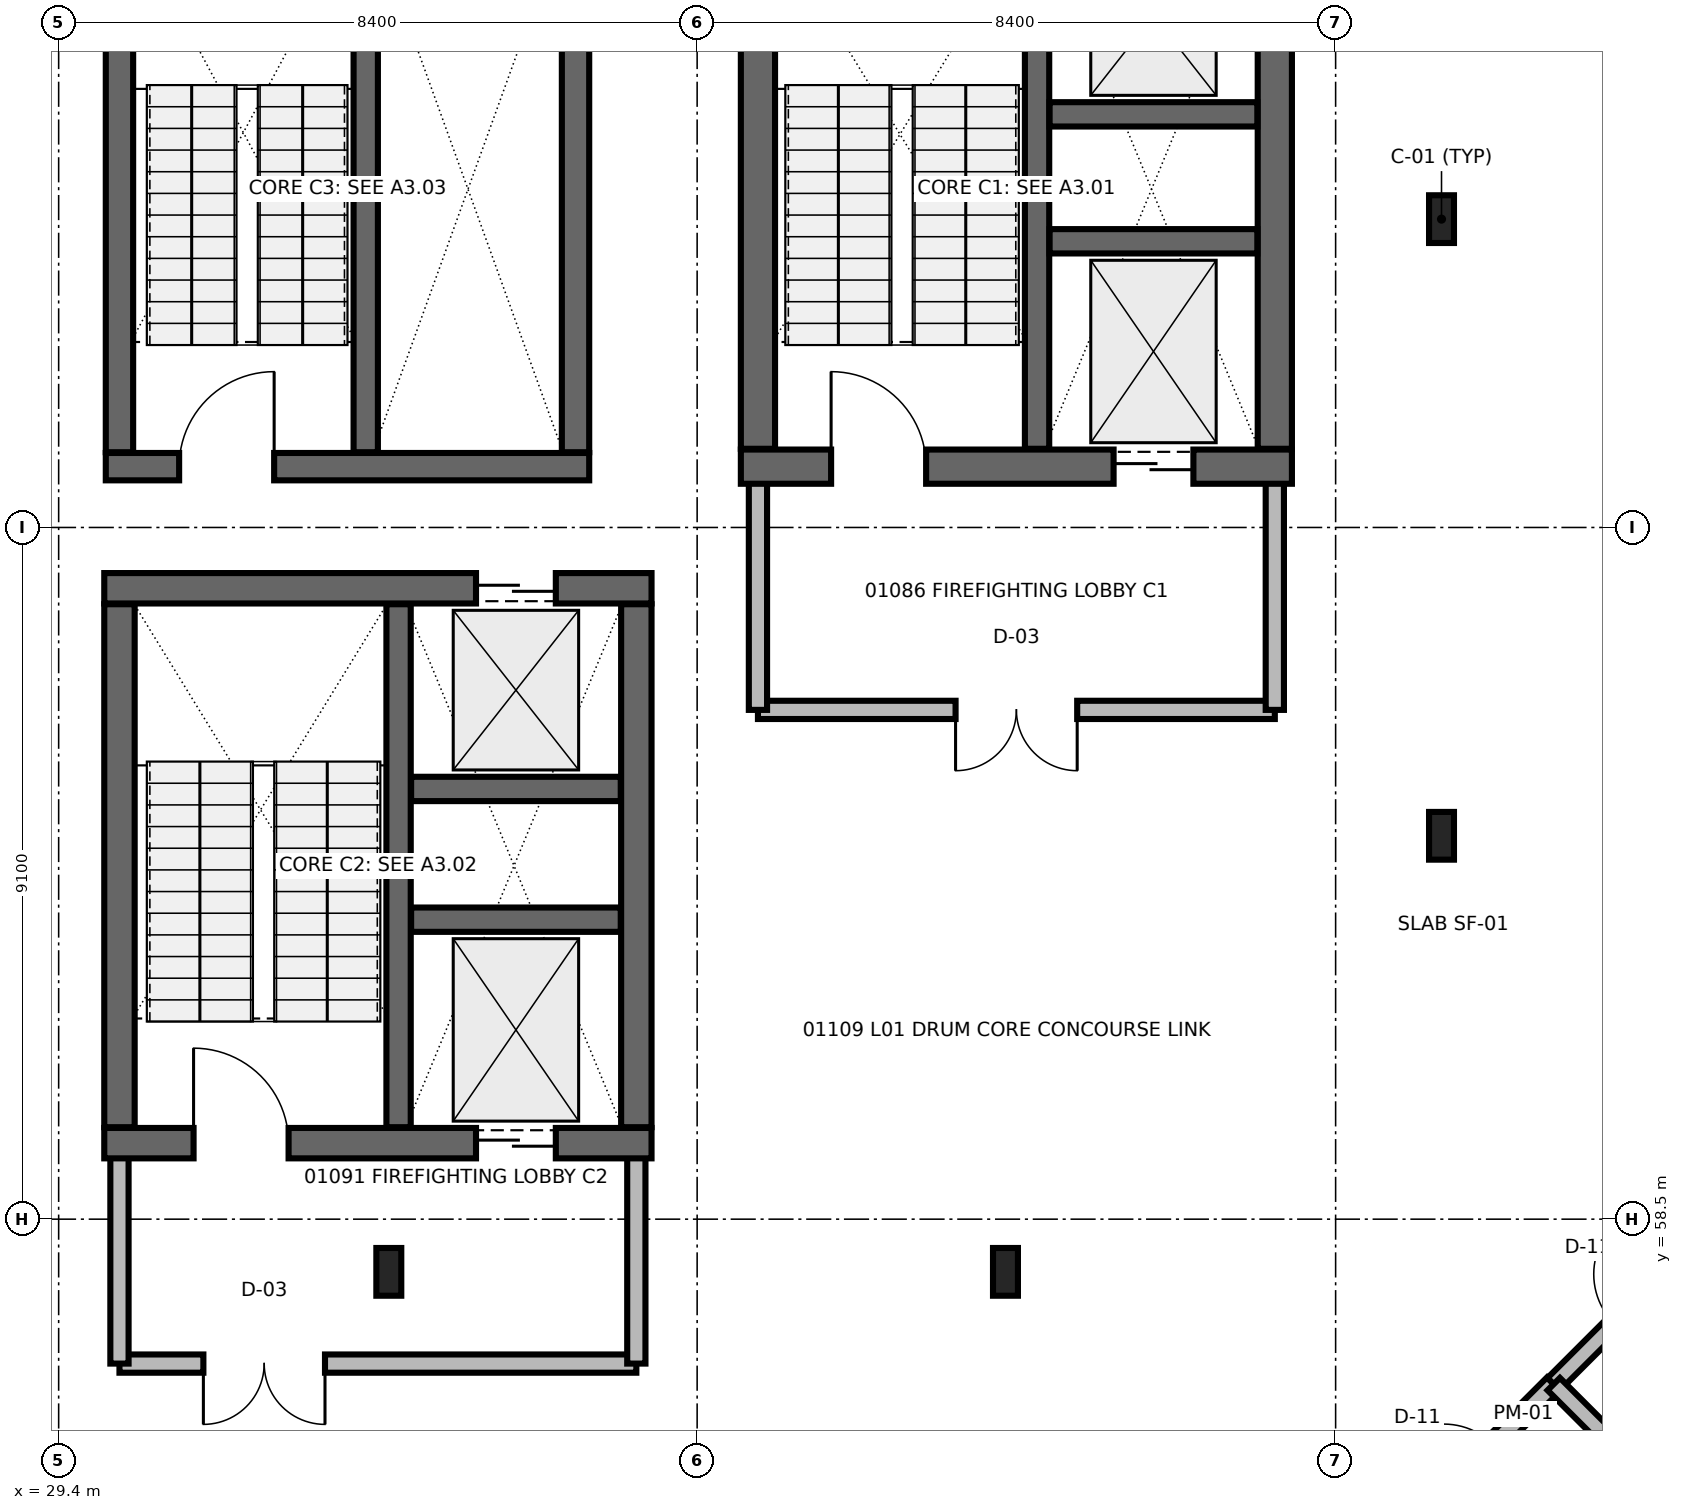
"""IFC4 building model, lengths in metres.
Left out: names, types, materials, properties, quantities, classifications, styles, units other than length and angle.
Written with IfcOpenShell. Run it as: python <this file> out.ifc"""

import sys

from ifc_helpers import new_model, si_unit, direction, frame, frame_2d, origin, origin_2d, place, context, subcontext, project, spatial, rectangle, i_section, extrude, element, fill, save


model = new_model("IFC4")
c1 = context("Model", 3, precision=1e-05, world=origin(), true_north=direction((0.0, 1.0)))
c2 = subcontext(c1, "Body", "Model", "MODEL_VIEW")
j1 = project(units=[si_unit("LENGTHUNIT", "METRE"), si_unit("PLANEANGLEUNIT", "RADIAN")], contexts=[c1])
p1 = place(None, origin())
s1 = spatial("IfcSite", under=j1, at=p1, CompositionType="ELEMENT")
p2 = place(p1, origin())
s2 = spatial("IfcBuilding", under=s1, at=p2, CompositionType="ELEMENT")
p3 = place(p2, frame((0.0, 0.0, 5.1)))
s3 = spatial("IfcBuildingStorey", under=s2, at=p3, CompositionType="ELEMENT", Elevation=5.1)
for number, where, z_axis, x_axis in (
    (1, (47.593, 71.656, 0.0), (0.0, 0.0, 1.0), (1.0, 0.0, 0.0)),
    (2, (33.744, 57.807, 0.0), (0.0, 0.0, 1.0), (1.0, 0.0, 0.0)),
    (3, (41.856, 57.807, 0.0), (0.0, 0.0, 1.0), (1.0, 0.0, 0.0)),
    (4, (47.593, 63.544, 0.0), (0.0, 0.0, 1.0), (1.0, 0.0, 0.0)),
):
    element("IfcColumn", number, at=place(p3, frame(where, z_axis=z_axis, x_axis=x_axis)), inside=s3, PredefinedType="COLUMN", context=c2, shape_type="SweptSolid", body=[
        extrude(i_section(OverallWidth=0.328, OverallDepth=0.628, WebThickness=0.017, FlangeThickness=0.028, at=origin_2d()), origin(), (0.0, 0.0, 1.0), 4.5),
    ])
p4 = place(p3, frame((49.572, 49.842, 0.0), z_axis=(0.0, 0.0, 1.0), x_axis=(0.707106781187, 0.707106781187, 0.0)))
e5 = element("IfcWall", 5, at=p4, inside=s3, PredefinedType="SOLIDWALL", context=c2, shape_type="SweptSolid", body=[
    extrude(rectangle(XDim=8.368, YDim=0.26, at=frame_2d((4.184, 0.0))), origin(), (0.0, 0.0, 1.0), 1.48),
])
p5 = place(p3, frame((38.6, 65.2, 0.0), z_axis=(0.0, 0.0, 1.0), x_axis=(1.0, 0.0, 0.0)))
e6 = element("IfcWall", 6, at=p5, inside=s3, PredefinedType="SOLIDWALL", context=c2, shape_type="SweptSolid", body=[
    extrude(rectangle(XDim=6.8, YDim=0.24, at=frame_2d((3.4, 0.0))), origin(), (0.0, 0.0, 1.0), 4.2),
])
p6 = place(p5, frame((2.6, 0.0, 0.0)))
e7 = element("IfcOpeningElement", 7, at=p6, cuts=e6, PredefinedType="OPENING", context=c2, shape_type="SweptSolid", body=[
    extrude(rectangle(XDim=1.6, YDim=2.2, at=frame_2d((0.8, 1.1))), frame((0.0, 0.13, 0.0), z_axis=(0.0, -1.0, 0.0), x_axis=(1.0, 0.0, 0.0)), (0.0, 0.0, 1.0), 0.26),
])
for number, where, z_axis, x_axis in (
    (8, (38.6, 68.4, 0.0), (0.0, 0.0, 1.0), (0.0, -1.0, 0.0)),
    (9, (45.4, 65.2, 0.0), (0.0, 0.0, 1.0), (0.0, 1.0, 0.0)),
):
    element("IfcWall", number, at=place(p3, frame(where, z_axis=z_axis, x_axis=x_axis)), inside=s3, PredefinedType="SOLIDWALL", context=c2, shape_type="SweptSolid", body=[
        extrude(rectangle(XDim=3.2, YDim=0.24, at=frame_2d((1.6, 0.0))), origin(), (0.0, 0.0, 1.0), 4.2),
    ])
p7 = place(p3, frame((38.375, 68.4, 0.0), z_axis=(0.0, 0.0, 1.0), x_axis=(1.0, 0.0, 0.0)))
e10 = element("IfcWall", 10, at=p7, inside=s3, PredefinedType="SHEAR", context=c2, shape_type="SweptSolid", body=[
    extrude(rectangle(XDim=7.25, YDim=0.45, at=frame_2d((3.625, 0.0))), origin(), (0.0, 0.0, 1.0), 4.22),
])
p8 = place(p7, frame((1.188, 0.0, 0.0)))
e11 = element("IfcOpeningElement", 11, at=p8, cuts=e10, PredefinedType="OPENING", context=c2, shape_type="SweptSolid", body=[
    extrude(rectangle(XDim=1.25, YDim=2.2, at=frame_2d((0.625, 1.1))), frame((0.0, 0.235, 0.0), z_axis=(0.0, -1.0, 0.0), x_axis=(1.0, 0.0, 0.0)), (0.0, 0.0, 1.0), 0.47),
])
p9 = place(p7, frame((4.904, 0.0, 0.0)))
e12 = element("IfcOpeningElement", 12, at=p9, cuts=e10, PredefinedType="OPENING", context=c2, shape_type="SweptSolid", body=[
    extrude(rectangle(XDim=1.05, YDim=2.15, at=frame_2d((0.525, 1.075))), frame((0.0, 0.235, 0.0), z_axis=(0.0, -1.0, 0.0), x_axis=(1.0, 0.0, 0.0)), (0.0, 0.0, 1.0), 0.47),
])
for number, where, z_axis, x_axis in (
    (13, (38.6, 68.635, 0.0), (0.0, 0.0, 1.0), (0.0, 1.0, 0.0)),
    (14, (45.4, 68.635, 0.0), (0.0, 0.0, 1.0), (0.0, 1.0, 0.0)),
):
    element("IfcWall", number, at=place(p3, frame(where, z_axis=z_axis, x_axis=x_axis)), inside=s3, PredefinedType="SHEAR", context=c2, shape_type="SweptSolid", body=[
        extrude(rectangle(XDim=6.83, YDim=0.45, at=frame_2d((3.415, 0.0))), origin(), (0.0, 0.0, 1.0), 4.22),
    ])
p10 = place(p3, frame((42.272, 68.635, 0.0), z_axis=(0.0, 0.0, 1.0), x_axis=(0.0, 1.0, 0.0)))
e15 = element("IfcWall", 15, at=p10, inside=s3, PredefinedType="SHEAR", context=c2, shape_type="SweptSolid", body=[
    extrude(rectangle(XDim=6.83, YDim=0.32, at=frame_2d((3.415, 0.0))), origin(), (0.0, 0.0, 1.0), 4.22),
])
for number, where, z_axis, x_axis in (
    (16, (42.437, 71.365, 0.0), (0.0, 0.0, 1.0), (1.0, 0.0, 0.0)),
    (17, (42.437, 73.035, 0.0), (0.0, 0.0, 1.0), (1.0, 0.0, 0.0)),
):
    element("IfcWall", number, at=place(p3, frame(where, z_axis=z_axis, x_axis=x_axis)), inside=s3, PredefinedType="SHEAR", context=c2, shape_type="SweptSolid", body=[
        extrude(rectangle(XDim=2.733, YDim=0.32, at=frame_2d((1.366, 0.0))), origin(), (0.0, 0.0, 1.0), 4.22),
    ])
p11 = place(p3, frame((30.2, 56.6, 0.0), z_axis=(0.0, 0.0, 1.0), x_axis=(1.0, 0.0, 0.0)))
e18 = element("IfcWall", 18, at=p11, inside=s3, PredefinedType="SOLIDWALL", context=c2, shape_type="SweptSolid", body=[
    extrude(rectangle(XDim=6.8, YDim=0.24, at=frame_2d((3.4, 0.0))), origin(), (0.0, 0.0, 1.0), 3.599),
])
p12 = place(p11, frame((1.104, 0.0, 0.0)))
e19 = element("IfcOpeningElement", 19, at=p12, cuts=e18, PredefinedType="OPENING", context=c2, shape_type="SweptSolid", body=[
    extrude(rectangle(XDim=1.6, YDim=2.2, at=frame_2d((0.8, 1.1))), frame((0.0, 0.13, 0.0), z_axis=(0.0, -1.0, 0.0), x_axis=(1.0, 0.0, 0.0)), (0.0, 0.0, 1.0), 0.26),
])
p13 = place(p3, frame((30.2, 59.5, 0.0), z_axis=(0.0, 0.0, 1.0), x_axis=(0.0, -1.0, 0.0)))
e20 = element("IfcWall", 20, at=p13, inside=s3, PredefinedType="SOLIDWALL", context=c2, shape_type="SweptSolid", body=[
    extrude(rectangle(XDim=2.9, YDim=0.24, at=frame_2d((1.45, 0.0))), origin(), (0.0, 0.0, 1.0), 4.2),
])
p14 = place(p3, frame((37.0, 56.6, 0.0), z_axis=(0.0, 0.0, 1.0), x_axis=(0.0, 1.0, 0.0)))
e21 = element("IfcWall", 21, at=p14, inside=s3, PredefinedType="SOLIDWALL", context=c2, shape_type="SweptSolid", body=[
    extrude(rectangle(XDim=2.9, YDim=0.24, at=frame_2d((1.45, 0.0))), origin(), (0.0, 0.0, 1.0), 3.599),
])
p15 = place(p3, frame((30.0, 59.5, 0.0), z_axis=(0.0, 0.0, 1.0), x_axis=(1.0, 0.0, 0.0)))
e22 = element("IfcWall", 22, at=p15, inside=s3, PredefinedType="SHEAR", context=c2, shape_type="SweptSolid", body=[
    extrude(rectangle(XDim=7.2, YDim=0.4, at=frame_2d((3.6, 0.0))), origin(), (0.0, 0.0, 1.0), 4.22),
])
p16 = place(p15, frame((1.175, 0.0, 0.0)))
e23 = element("IfcOpeningElement", 23, at=p16, cuts=e22, PredefinedType="OPENING", context=c2, shape_type="SweptSolid", body=[
    extrude(rectangle(XDim=1.25, YDim=2.2, at=frame_2d((0.625, 1.1))), frame((0.0, 0.21, 0.0), z_axis=(0.0, -1.0, 0.0), x_axis=(1.0, 0.0, 0.0)), (0.0, 0.0, 1.0), 0.42),
])
p17 = place(p15, frame((4.891, 0.0, 0.0)))
e24 = element("IfcOpeningElement", 24, at=p17, cuts=e22, PredefinedType="OPENING", context=c2, shape_type="SweptSolid", body=[
    extrude(rectangle(XDim=1.05, YDim=2.15, at=frame_2d((0.525, 1.075))), frame((0.0, 0.21, 0.0), z_axis=(0.0, -1.0, 0.0), x_axis=(1.0, 0.0, 0.0)), (0.0, 0.0, 1.0), 0.42),
])
p18 = place(p3, frame((30.0, 66.8, 0.0), z_axis=(0.0, 0.0, 1.0), x_axis=(1.0, 0.0, 0.0)))
e25 = element("IfcWall", 25, at=p18, inside=s3, PredefinedType="SHEAR", context=c2, shape_type="SweptSolid", body=[
    extrude(rectangle(XDim=7.2, YDim=0.4, at=frame_2d((3.6, 0.0))), origin(), (0.0, 0.0, 1.0), 4.22),
])
p19 = place(p18, frame((4.891, 0.0, 0.0)))
e26 = element("IfcOpeningElement", 26, at=p19, cuts=e25, PredefinedType="OPENING", context=c2, shape_type="SweptSolid", body=[
    extrude(rectangle(XDim=1.05, YDim=2.15, at=frame_2d((0.525, 1.075))), frame((0.0, 0.21, 0.0), z_axis=(0.0, -1.0, 0.0), x_axis=(1.0, 0.0, 0.0)), (0.0, 0.0, 1.0), 0.42),
])
for number, where, z_axis, x_axis in (
    (27, (30.2, 59.71, 0.0), (0.0, 0.0, 1.0), (0.0, 1.0, 0.0)),
    (28, (37.0, 59.71, 0.0), (0.0, 0.0, 1.0), (0.0, 1.0, 0.0)),
):
    element("IfcWall", number, at=place(p3, frame(where, z_axis=z_axis, x_axis=x_axis)), inside=s3, PredefinedType="SHEAR", context=c2, shape_type="SweptSolid", body=[
        extrude(rectangle(XDim=6.88, YDim=0.4, at=frame_2d((3.44, 0.0))), origin(), (0.0, 0.0, 1.0), 4.22),
    ])
p20 = place(p3, frame((33.872, 59.71, 0.0), z_axis=(0.0, 0.0, 1.0), x_axis=(0.0, 1.0, 0.0)))
e29 = element("IfcWall", 29, at=p20, inside=s3, PredefinedType="SHEAR", context=c2, shape_type="SweptSolid", body=[
    extrude(rectangle(XDim=6.88, YDim=0.32, at=frame_2d((3.44, 0.0))), origin(), (0.0, 0.0, 1.0), 4.22),
])
for number, where, z_axis, x_axis in (
    (30, (34.037, 62.44, 0.0), (0.0, 0.0, 1.0), (1.0, 0.0, 0.0)),
    (31, (34.037, 64.16, 0.0), (0.0, 0.0, 1.0), (1.0, 0.0, 0.0)),
):
    element("IfcWall", number, at=place(p3, frame(where, z_axis=z_axis, x_axis=x_axis)), inside=s3, PredefinedType="SHEAR", context=c2, shape_type="SweptSolid", body=[
        extrude(rectangle(XDim=2.758, YDim=0.32, at=frame_2d((1.379, 0.0))), origin(), (0.0, 0.0, 1.0), 4.22),
    ])
p21 = place(p3, frame((30.02, 68.4, 0.0), z_axis=(0.0, 0.0, 1.0), x_axis=(1.0, 0.0, 0.0)))
e32 = element("IfcWall", 32, at=p21, inside=s3, PredefinedType="SHEAR", context=c2, shape_type="SweptSolid", body=[
    extrude(rectangle(XDim=6.36, YDim=0.36, at=frame_2d((3.18, 0.0))), origin(), (0.0, 0.0, 1.0), 4.22),
])
p22 = place(p21, frame((0.965, 0.0, 0.0)))
e33 = element("IfcOpeningElement", 33, at=p22, cuts=e32, PredefinedType="OPENING", context=c2, shape_type="SweptSolid", body=[
    extrude(rectangle(XDim=1.25, YDim=2.2, at=frame_2d((0.625, 1.1))), frame((0.0, 0.19, 0.0), z_axis=(0.0, -1.0, 0.0), x_axis=(1.0, 0.0, 0.0)), (0.0, 0.0, 1.0), 0.38),
])
for number, where, z_axis, x_axis in (
    (34, (30.2, 68.59, 0.0), (0.0, 0.0, 1.0), (0.0, 1.0, 0.0)),
    (35, (36.2, 68.59, 0.0), (0.0, 0.0, 1.0), (0.0, 1.0, 0.0)),
):
    element("IfcWall", number, at=place(p3, frame(where, z_axis=z_axis, x_axis=x_axis)), inside=s3, PredefinedType="SHEAR", context=c2, shape_type="SweptSolid", body=[
        extrude(rectangle(XDim=6.92, YDim=0.36, at=frame_2d((3.46, 0.0))), origin(), (0.0, 0.0, 1.0), 4.22),
    ])
p23 = place(p3, frame((33.44, 68.59, 0.0), z_axis=(0.0, 0.0, 1.0), x_axis=(0.0, 1.0, 0.0)))
e36 = element("IfcWall", 36, at=p23, inside=s3, PredefinedType="SHEAR", context=c2, shape_type="SweptSolid", body=[
    extrude(rectangle(XDim=6.92, YDim=0.32, at=frame_2d((3.46, 0.0))), origin(), (0.0, 0.0, 1.0), 4.22),
])
p24 = place(p3, frame((46.828, 54.089, 0.0), z_axis=(0.0, 0.0, 1.0), x_axis=(0.707106781187, 0.707106781187, 0.0)))
e37 = element("IfcWall", 37, at=p24, inside=s3, PredefinedType="PLUMBINGWALL", context=c2, shape_type="SweptSolid", body=[
    extrude(rectangle(XDim=3.17, YDim=0.25, at=frame_2d((1.585, 0.0))), origin(), (0.0, 0.0, 1.0), 3.599),
])
p25 = place(p24, frame((1.125, 0.0, 0.0)))
e38 = element("IfcOpeningElement", 38, at=p25, cuts=e37, PredefinedType="OPENING", context=c2, shape_type="SweptSolid", body=[
    extrude(rectangle(XDim=0.92, YDim=2.1, at=frame_2d((0.46, 1.05))), frame((0.0, 0.135, 0.0), z_axis=(0.0, -1.0, 0.0), x_axis=(1.0, 0.0, 0.0)), (0.0, 0.0, 1.0), 0.27),
])
p26 = place(p3, frame((49.07, 56.33, 0.0), z_axis=(0.0, 0.0, 1.0), x_axis=(0.707106781187, 0.707106781187, 0.0)))
e39 = element("IfcWall", 39, at=p26, inside=s3, PredefinedType="PLUMBINGWALL", context=c2, shape_type="SweptSolid", body=[
    extrude(rectangle(XDim=3.17, YDim=0.23, at=frame_2d((1.585, 0.0))), origin(), (0.0, 0.0, 1.0), 4.2),
])
p27 = place(p26, frame((1.125, 0.0, 0.0)))
e40 = element("IfcOpeningElement", 40, at=p27, cuts=e39, PredefinedType="OPENING", context=c2, shape_type="SweptSolid", body=[
    extrude(rectangle(XDim=0.92, YDim=2.1, at=frame_2d((0.46, 1.05))), frame((0.0, 0.125, 0.0), z_axis=(0.0, -1.0, 0.0), x_axis=(1.0, 0.0, 0.0)), (0.0, 0.0, 1.0), 0.25),
])
p28 = place(p3, frame((48.05, 52.26, 0.0), z_axis=(0.0, 0.0, 1.0), x_axis=(0.707123738387, 0.707089823579, 0.0)))
e41 = element("IfcWall", 41, at=p28, inside=s3, PredefinedType="PLUMBINGWALL", context=c2, shape_type="SweptSolid", body=[
    extrude(rectangle(XDim=7.199, YDim=0.25, at=frame_2d((3.599, 0.0))), origin(), (0.0, 0.0, 1.0), 3.739),
])
p29 = place(p3, frame((49.07, 56.33, 0.0), z_axis=(0.0, 0.0, 1.0), x_axis=(0.707106781187, -0.707106781187, 0.0)))
e42 = element("IfcWall", 42, at=p29, inside=s3, PredefinedType="PLUMBINGWALL", context=c2, shape_type="SweptSolid", body=[
    extrude(rectangle(XDim=2.158, YDim=0.23, at=frame_2d((1.079, 0.0))), origin(), (0.0, 0.0, 1.0), 3.739),
])
p30 = place(p6, frame((1.6, 0.0, 0.0), z_axis=(0.0, 0.0, 1.0), x_axis=(-1.0, 0.0, 0.0)))
e43 = element("IfcDoor", 43, at=p30, inside=s3, OperationType="DOUBLE_DOOR_SINGLE_SWING", PredefinedType="DOOR", context=c2, shape_type="SweptSolid", body=[
    extrude(rectangle(XDim=1.6, YDim=2.2, at=frame_2d((0.8, 1.1))), frame((0.0, 0.025, 0.0), z_axis=(0.0, -1.0, 0.0), x_axis=(1.0, 0.0, 0.0)), (0.0, 0.0, 1.0), 0.05),
])
fill(e7, e43)
p31 = place(p8, frame((1.25, 0.0, 0.0), z_axis=(0.0, 0.0, 1.0), x_axis=(-1.0, 0.0, 0.0)))
e44 = element("IfcDoor", 44, at=p31, inside=s3, OperationType="SINGLE_SWING_RIGHT", PredefinedType="DOOR", context=c2, shape_type="SweptSolid", body=[
    extrude(rectangle(XDim=1.25, YDim=2.2, at=frame_2d((0.625, 1.1))), frame((0.0, 0.025, 0.0), z_axis=(0.0, -1.0, 0.0), x_axis=(1.0, 0.0, 0.0)), (0.0, 0.0, 1.0), 0.05),
])
fill(e11, e44)
p32 = place(p9, frame((1.05, 0.0, 0.0), z_axis=(0.0, 0.0, 1.0), x_axis=(-1.0, 0.0, 0.0)))
e45 = element("IfcDoor", 45, at=p32, inside=s3, OperationType="DOUBLE_DOOR_SLIDING", PredefinedType="DOOR", context=c2, shape_type="SweptSolid", body=[
    extrude(rectangle(XDim=1.05, YDim=2.15, at=frame_2d((0.525, 1.075))), frame((0.0, 0.025, 0.0), z_axis=(0.0, -1.0, 0.0), x_axis=(1.0, 0.0, 0.0)), (0.0, 0.0, 1.0), 0.05),
])
fill(e12, e45)
p33 = place(p12, frame((1.6, 0.0, 0.0), z_axis=(0.0, 0.0, 1.0), x_axis=(-1.0, 0.0, 0.0)))
e46 = element("IfcDoor", 46, at=p33, inside=s3, OperationType="DOUBLE_DOOR_SINGLE_SWING", PredefinedType="DOOR", context=c2, shape_type="SweptSolid", body=[
    extrude(rectangle(XDim=1.6, YDim=2.2, at=frame_2d((0.8, 1.1))), frame((0.0, 0.025, 0.0), z_axis=(0.0, -1.0, 0.0), x_axis=(1.0, 0.0, 0.0)), (0.0, 0.0, 1.0), 0.05),
])
fill(e19, e46)
p34 = place(p16, frame((1.25, 0.0, 0.0), z_axis=(0.0, 0.0, 1.0), x_axis=(-1.0, 0.0, 0.0)))
e47 = element("IfcDoor", 47, at=p34, inside=s3, OperationType="SINGLE_SWING_RIGHT", PredefinedType="DOOR", context=c2, shape_type="SweptSolid", body=[
    extrude(rectangle(XDim=1.25, YDim=2.2, at=frame_2d((0.625, 1.1))), frame((0.0, 0.025, 0.0), z_axis=(0.0, -1.0, 0.0), x_axis=(1.0, 0.0, 0.0)), (0.0, 0.0, 1.0), 0.05),
])
fill(e23, e47)
p35 = place(p17, frame((1.05, 0.0, 0.0), z_axis=(0.0, 0.0, 1.0), x_axis=(-1.0, 0.0, 0.0)))
e48 = element("IfcDoor", 48, at=p35, inside=s3, OperationType="DOUBLE_DOOR_SLIDING", PredefinedType="DOOR", context=c2, shape_type="SweptSolid", body=[
    extrude(rectangle(XDim=1.05, YDim=2.15, at=frame_2d((0.525, 1.075))), frame((0.0, 0.025, 0.0), z_axis=(0.0, -1.0, 0.0), x_axis=(1.0, 0.0, 0.0)), (0.0, 0.0, 1.0), 0.05),
])
fill(e24, e48)
p36 = place(p19, origin())
e49 = element("IfcDoor", 49, at=p36, inside=s3, OperationType="DOUBLE_DOOR_SLIDING", PredefinedType="DOOR", context=c2, shape_type="SweptSolid", body=[
    extrude(rectangle(XDim=1.05, YDim=2.15, at=frame_2d((0.525, 1.075))), frame((0.0, 0.025, 0.0), z_axis=(0.0, -1.0, 0.0), x_axis=(1.0, 0.0, 0.0)), (0.0, 0.0, 1.0), 0.05),
])
fill(e26, e49)
p37 = place(p22, frame((1.25, 0.0, 0.0), z_axis=(0.0, 0.0, 1.0), x_axis=(-1.0, 0.0, 0.0)))
e50 = element("IfcDoor", 50, at=p37, inside=s3, OperationType="SINGLE_SWING_LEFT", PredefinedType="DOOR", context=c2, shape_type="SweptSolid", body=[
    extrude(rectangle(XDim=1.25, YDim=2.2, at=frame_2d((0.625, 1.1))), frame((0.0, 0.025, 0.0), z_axis=(0.0, -1.0, 0.0), x_axis=(1.0, 0.0, 0.0)), (0.0, 0.0, 1.0), 0.05),
])
fill(e33, e50)
save(model, sys.argv[1])
